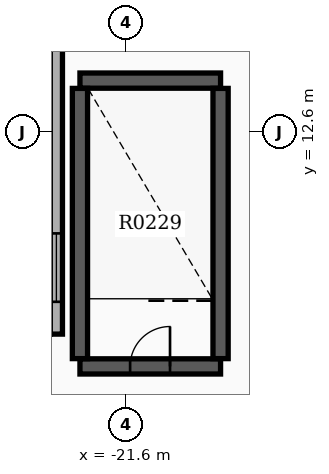
"""IFC4 building model, lengths in metres.
Left out: names, types, materials, properties, quantities, classifications, styles, units other than length and angle.
Written with IfcOpenShell. Run it as: python <this file> out.ifc"""

import sys

from ifc_helpers import new_model, si_unit, direction, frame, frame_2d, origin, place, context, subcontext, project, spatial, rectangle, extrude, element, fill, save


model = new_model("IFC4")
c1 = context("Model", 3, precision=1e-05, world=origin(), true_north=direction((0.0, 1.0)))
c2 = subcontext(c1, "Body", "Model", "MODEL_VIEW")
j1 = project(units=[si_unit("LENGTHUNIT", "METRE"), si_unit("PLANEANGLEUNIT", "RADIAN")], contexts=[c1])
p1 = place(None, origin())
s1 = spatial("IfcSite", under=j1, at=p1, CompositionType="ELEMENT")
p2 = place(p1, origin())
s2 = spatial("IfcBuilding", under=s1, at=p2, CompositionType="ELEMENT")
p3 = place(p2, frame((0.0, 0.0, 19.2)))
s3 = spatial("IfcBuildingStorey", under=s2, at=p3, CompositionType="ELEMENT", Elevation=19.2)
p4 = place(p3, frame((-22.82, 13.95, 0.0), z_axis=(0.0, 0.0, 1.0), x_axis=(1.0, 0.0, 0.0)))
e1 = element("IfcWall", 1, at=p4, inside=s3, PredefinedType="SHEAR", context=c2, shape_type="SweptSolid", body=[
    extrude(rectangle(XDim=3.7, YDim=0.4, at=frame_2d((1.85, 0.0))), origin(), (0.0, 0.0, 1.0), 4.3),
])
p5 = place(p3, frame((-22.82, 6.43, 0.0), z_axis=(0.0, 0.0, 1.0), x_axis=(1.0, 0.0, 0.0)))
e2 = element("IfcWall", 2, at=p5, inside=s3, PredefinedType="SHEAR", context=c2, shape_type="SweptSolid", body=[
    extrude(rectangle(XDim=3.7, YDim=0.4, at=frame_2d((1.85, 0.0))), origin(), (0.0, 0.0, 1.0), 4.3),
])
p6 = place(p5, frame((1.32, 0.0, 0.0)))
e3 = element("IfcOpeningElement", 3, at=p6, cuts=e2, PredefinedType="OPENING", context=c2, shape_type="SweptSolid", body=[
    extrude(rectangle(XDim=1.05, YDim=2.15, at=frame_2d((0.525, 1.075))), frame((0.0, 0.21, 0.0), z_axis=(0.0, -1.0, 0.0), x_axis=(1.0, 0.0, 0.0)), (0.0, 0.0, 1.0), 0.42),
])
for number, where, z_axis, x_axis in (
    (4, (-22.82, 6.635, 0.0), (0.0, 0.0, 1.0), (0.0, 1.0, 0.0)),
    (5, (-19.12, 6.635, 0.0), (0.0, 0.0, 1.0), (0.0, 1.0, 0.0)),
):
    element("IfcWall", number, at=place(p3, frame(where, z_axis=z_axis, x_axis=x_axis)), inside=s3, PredefinedType="SHEAR", context=c2, shape_type="SweptSolid", body=[
        extrude(rectangle(XDim=7.11, YDim=0.4, at=frame_2d((3.555, 0.0))), origin(), (0.0, 0.0, 1.0), 4.3),
    ])
p7 = place(p3, frame((-23.44, 7.28, 0.0), z_axis=(0.0, 0.0, 1.0), x_axis=(0.0, 1.0, 0.0)))
e6 = element("IfcWall", 6, at=p7, inside=s3, PredefinedType="STANDARD", context=c2, shape_type="SweptSolid", body=[
    extrude(rectangle(XDim=13.12, YDim=0.32, at=frame_2d((6.56, 0.0))), origin(), (0.0, 0.0, 1.0), 3.38),
])
p8 = place(p7, frame((0.85, 0.0, 0.65)))
e7 = element("IfcOpeningElement", 7, at=p8, cuts=e6, PredefinedType="OPENING", context=c2, shape_type="SweptSolid", body=[
    extrude(rectangle(XDim=1.8, YDim=1.8, at=frame_2d((0.9, 0.9))), frame((0.0, 0.17, 0.0), z_axis=(0.0, -1.0, 0.0), x_axis=(1.0, 0.0, 0.0)), (0.0, 0.0, 1.0), 0.34),
])
p9 = place(p7, frame((8.55, 0.0, 0.0)))
e8 = element("IfcOpeningElement", 8, at=p9, cuts=e6, PredefinedType="OPENING", context=c2, shape_type="SweptSolid", body=[
    extrude(rectangle(XDim=1.1, YDim=2.15, at=frame_2d((0.55, 1.075))), frame((0.0, 0.17, 0.0), z_axis=(0.0, -1.0, 0.0), x_axis=(1.0, 0.0, 0.0)), (0.0, 0.0, 1.0), 0.34),
])
p10 = place(p8, origin())
e9 = element("IfcWindow", 9, at=p10, inside=s3, PartitioningType="SINGLE_PANEL", PredefinedType="WINDOW", context=c2, shape_type="SweptSolid", body=[
    extrude(rectangle(XDim=1.8, YDim=1.8, at=frame_2d((0.9, 0.9))), frame((0.0, 0.03, 0.0), z_axis=(0.0, -1.0, 0.0), x_axis=(1.0, 0.0, 0.0)), (0.0, 0.0, 1.0), 0.06),
])
fill(e7, e9)
p11 = place(p6, origin())
e10 = element("IfcDoor", 10, at=p11, inside=s3, OperationType="SINGLE_SWING_RIGHT", PredefinedType="DOOR", context=c2, shape_type="SweptSolid", body=[
    extrude(rectangle(XDim=1.05, YDim=2.15, at=frame_2d((0.525, 1.075))), frame((0.0, 0.025, 0.0), z_axis=(0.0, -1.0, 0.0), x_axis=(1.0, 0.0, 0.0)), (0.0, 0.0, 1.0), 0.05),
])
fill(e3, e10)
save(model, sys.argv[1])
